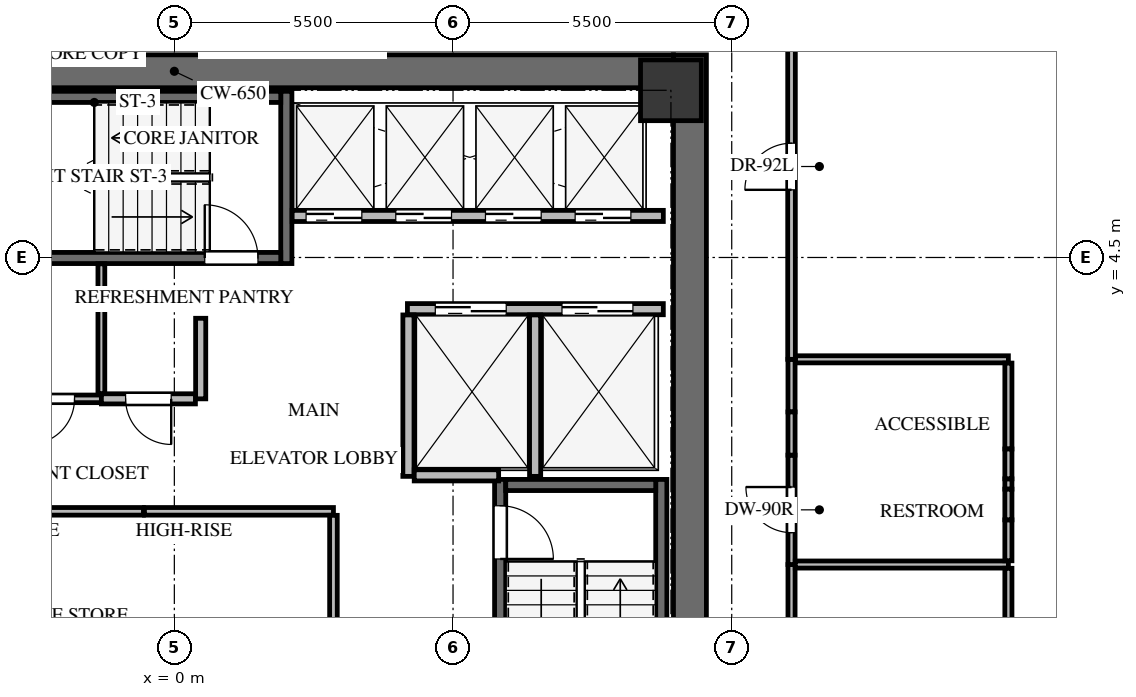
"""IFC4 building model, lengths in metres.
Left out: names, types, materials, properties, quantities, classifications, styles, units other than length and angle.
Written with IfcOpenShell. Run it as: python <this file> out.ifc"""

import sys

from ifc_helpers import new_model, si_unit, direction, frame, frame_2d, origin, origin_2d, place, context, subcontext, project, spatial, rectangle, extrude, source, transform, mapped, element, fill, save


model = new_model("IFC4")
c1 = context("Model", 3, precision=1e-05, world=origin(), true_north=direction((0.0, 1.0)))
c2 = subcontext(c1, "Body", "Model", "MODEL_VIEW")
j1 = project(units=[si_unit("LENGTHUNIT", "METRE"), si_unit("PLANEANGLEUNIT", "RADIAN")], contexts=[c1])
p1 = place(None, origin())
s1 = spatial("IfcSite", under=j1, at=p1, CompositionType="ELEMENT")
p2 = place(p1, origin())
s2 = spatial("IfcBuilding", under=s1, at=p2, CompositionType="ELEMENT")
p3 = place(p2, frame((0.0, 0.0, 203.2)))
s3 = spatial("IfcBuildingStorey", under=s2, at=p3, CompositionType="ELEMENT", Elevation=203.2)
p4 = place(p3, frame((10.175, -8.5, 0.0), z_axis=(0.0, 0.0, 1.0), x_axis=(0.0, 1.0, 0.0)))
e1 = element("IfcWall", 1, at=p4, inside=s3, PredefinedType="SHEAR", context=c2, shape_type="SweptSolid", body=[
    extrude(rectangle(XDim=17.0, YDim=0.65, at=frame_2d((8.5, 0.0))), origin(), (0.0, 0.0, 1.0), 3.0),
])
p5 = place(p3, frame((-9.85, 8.175, 0.0), z_axis=(0.0, 0.0, 1.0), x_axis=(1.0, 0.0, 0.0)))
e2 = element("IfcWall", 2, at=p5, inside=s3, PredefinedType="SHEAR", context=c2, shape_type="SweptSolid", body=[
    extrude(rectangle(XDim=19.7, YDim=0.65, at=frame_2d((9.85, 0.0))), origin(), (0.0, 0.0, 1.0), 3.0),
])
p6 = place(p3, frame((9.61, -7.77, -0.24), z_axis=(0.0, 0.0, 1.0), x_axis=(0.0, 1.0, 0.0)))
e3 = element("IfcWall", 3, at=p6, inside=s3, PredefinedType="SHEAR", context=c2, shape_type="SweptSolid", body=[
    extrude(rectangle(XDim=7.89, YDim=0.22, at=frame_2d((3.945, 0.0))), origin(), (0.0, 0.0, 1.0), 3.0),
])
p7 = place(p3, frame((6.43, 0.12, -0.24), z_axis=(0.0, 0.0, 1.0), x_axis=(0.0, -1.0, 0.0)))
e4 = element("IfcWall", 4, at=p7, inside=s3, PredefinedType="SHEAR", context=c2, shape_type="SweptSolid", body=[
    extrude(rectangle(XDim=7.89, YDim=0.22, at=frame_2d((3.945, 0.0))), origin(), (0.0, 0.0, 1.0), 3.0),
])
p8 = place(p7, frame((0.52, 0.0, 0.0)))
e5 = element("IfcOpeningElement", 5, at=p8, cuts=e4, PredefinedType="OPENING", context=c2, shape_type="SweptSolid", body=[
    extrude(rectangle(XDim=1.05, YDim=2.15, at=frame_2d((0.525, 1.075))), frame((0.0, 0.12, 0.0), z_axis=(0.0, -1.0, 0.0), x_axis=(1.0, 0.0, 0.0)), (0.0, 0.0, 1.0), 0.24),
])
p9 = place(p3, frame((9.5, 0.01, -0.24), z_axis=(0.0, 0.0, 1.0), x_axis=(-1.0, 0.0, 0.0)))
e6 = element("IfcWall", 6, at=p9, inside=s3, PredefinedType="SHEAR", context=c2, shape_type="SweptSolid", body=[
    extrude(rectangle(XDim=2.96, YDim=0.22, at=frame_2d((1.48, 0.0))), origin(), (0.0, 0.0, 1.0), 3.0),
])
p10 = place(p3, frame((2.21, 4.38, -0.24), z_axis=(0.0, 0.0, 1.0), x_axis=(0.0, 1.0, 0.0)))
e7 = element("IfcWall", 7, at=p10, inside=s3, PredefinedType="SHEAR", context=c2, shape_type="SweptSolid", body=[
    extrude(rectangle(XDim=3.4, YDim=0.22, at=frame_2d((1.7, 0.0))), origin(), (0.0, 0.0, 1.0), 3.0),
])
p11 = place(p3, frame((-5.25, 4.49, -0.24), z_axis=(0.0, 0.0, 1.0), x_axis=(1.0, 0.0, 0.0)))
e8 = element("IfcWall", 8, at=p11, inside=s3, PredefinedType="SHEAR", context=c2, shape_type="SweptSolid", body=[
    extrude(rectangle(XDim=7.35, YDim=0.22, at=frame_2d((3.675, 0.0))), origin(), (0.0, 0.0, 1.0), 3.0),
])
p12 = place(p11, frame((5.85, 0.0, 0.0)))
e9 = element("IfcOpeningElement", 9, at=p12, cuts=e8, PredefinedType="OPENING", context=c2, shape_type="SweptSolid", body=[
    extrude(rectangle(XDim=1.05, YDim=2.15, at=frame_2d((0.525, 1.075))), frame((0.0, 0.12, 0.0), z_axis=(0.0, -1.0, 0.0), x_axis=(1.0, 0.0, 0.0)), (0.0, 0.0, 1.0), 0.24),
])
p13 = place(p3, frame((2.1, 7.67, -0.24), z_axis=(0.0, 0.0, 1.0), x_axis=(-1.0, 0.0, 0.0)))
e10 = element("IfcWall", 10, at=p13, inside=s3, PredefinedType="SHEAR", context=c2, shape_type="SweptSolid", body=[
    extrude(rectangle(XDim=7.35, YDim=0.22, at=frame_2d((3.675, 0.0))), origin(), (0.0, 0.0, 1.0), 3.0),
])
m1 = source(origin(), c2, "Body", "SweptSolid", [
    extrude(rectangle(XDim=1.2, YDim=1.2, at=origin_2d()), origin(), (0.0, 0.0, 1.0), 3.0),
])
p14 = place(p3, frame((9.8, 7.8, -0.24), z_axis=(0.0, 0.0, 1.0), x_axis=(1.0, 0.0, 0.0)))
e11 = element("IfcColumn", 11, at=p14, inside=s3, PredefinedType="COLUMN", context=c2, shape_type="MappedRepresentation", body=[
    mapped(m1, transform((0.0, 0.0, 0.0), x_axis=(1.0, 0.0, 0.0), y_axis=(0.0, 1.0, 0.0), z_axis=(0.0, 0.0, 1.0), scale=1.0)),
])
p15 = place(p3, frame((4.6, 3.48, 0.0), z_axis=(0.0, 0.0, 1.0), x_axis=(1.0, 0.0, 0.0)))
e12 = element("IfcWall", 12, at=p15, inside=s3, PredefinedType="SOLIDWALL", context=c2, shape_type="SweptSolid", body=[
    extrude(rectangle(XDim=5.05, YDim=0.22, at=frame_2d((2.525, 0.0))), origin(), (0.0, 0.0, 1.0), 2.745),
])
p16 = place(p15, frame((0.55, 0.0, 0.0)))
e13 = element("IfcOpeningElement", 13, at=p16, cuts=e12, PredefinedType="OPENING", context=c2, shape_type="SweptSolid", body=[
    extrude(rectangle(XDim=1.4, YDim=2.15, at=frame_2d((0.7, 1.075))), frame((0.0, 0.12, 0.0), z_axis=(0.0, -1.0, 0.0), x_axis=(1.0, 0.0, 0.0)), (0.0, 0.0, 1.0), 0.24),
])
p17 = place(p15, frame((3.05, 0.0, 0.0)))
e14 = element("IfcOpeningElement", 14, at=p17, cuts=e12, PredefinedType="OPENING", context=c2, shape_type="SweptSolid", body=[
    extrude(rectangle(XDim=1.4, YDim=2.15, at=frame_2d((0.7, 1.075))), frame((0.0, 0.12, 0.0), z_axis=(0.0, -1.0, 0.0), x_axis=(1.0, 0.0, 0.0)), (0.0, 0.0, 1.0), 0.24),
])
for number, where, z_axis, x_axis in (
    (15, (4.62, 0.18, 0.0), (0.0, 0.0, 1.0), (0.0, 1.0, 0.0)),
    (16, (7.12, 0.18, 0.0), (0.0, 0.0, 1.0), (0.0, 1.0, 0.0)),
):
    element("IfcWall", number, at=place(p3, frame(where, z_axis=z_axis, x_axis=x_axis)), inside=s3, PredefinedType="SOLIDWALL", context=c2, shape_type="SweptSolid", body=[
        extrude(rectangle(XDim=3.186, YDim=0.22, at=frame_2d((1.593, 0.0))), origin(), (0.0, 0.0, 1.0), 2.745),
    ])
p18 = place(p3, frame((4.734, 0.2, 0.0), z_axis=(0.0, 0.0, 1.0), x_axis=(1.0, 0.0, 0.0)))
e17 = element("IfcWall", 17, at=p18, inside=s3, PredefinedType="SOLIDWALL", context=c2, shape_type="SweptSolid", body=[
    extrude(rectangle(XDim=1.666, YDim=0.22, at=frame_2d((0.833, 0.0))), origin(), (0.0, 0.0, 1.0), 2.745),
])
p19 = place(p3, frame((2.325, 5.32, 0.0), z_axis=(0.0, 0.0, 1.0), x_axis=(1.0, 0.0, 0.0)))
e18 = element("IfcWall", 18, at=p19, inside=s3, PredefinedType="SOLIDWALL", context=c2, shape_type="SweptSolid", body=[
    extrude(rectangle(XDim=7.325, YDim=0.22, at=frame_2d((3.663, 0.0))), origin(), (0.0, 0.0, 1.0), 2.745),
])
p20 = place(p19, frame((0.275, 0.0, 0.0)))
e19 = element("IfcOpeningElement", 19, at=p20, cuts=e18, PredefinedType="OPENING", context=c2, shape_type="SweptSolid", body=[
    extrude(rectangle(XDim=1.1, YDim=2.15, at=frame_2d((0.55, 1.075))), frame((0.0, 0.12, 0.0), z_axis=(0.0, -1.0, 0.0), x_axis=(1.0, 0.0, 0.0)), (0.0, 0.0, 1.0), 0.24),
])
p21 = place(p19, frame((2.045, 0.0, 0.0)))
e20 = element("IfcOpeningElement", 20, at=p21, cuts=e18, PredefinedType="OPENING", context=c2, shape_type="SweptSolid", body=[
    extrude(rectangle(XDim=1.1, YDim=2.15, at=frame_2d((0.55, 1.075))), frame((0.0, 0.12, 0.0), z_axis=(0.0, -1.0, 0.0), x_axis=(1.0, 0.0, 0.0)), (0.0, 0.0, 1.0), 0.24),
])
p22 = place(p19, frame((3.815, 0.0, 0.0)))
e21 = element("IfcOpeningElement", 21, at=p22, cuts=e18, PredefinedType="OPENING", context=c2, shape_type="SweptSolid", body=[
    extrude(rectangle(XDim=1.1, YDim=2.15, at=frame_2d((0.55, 1.075))), frame((0.0, 0.12, 0.0), z_axis=(0.0, -1.0, 0.0), x_axis=(1.0, 0.0, 0.0)), (0.0, 0.0, 1.0), 0.24),
])
p23 = place(p19, frame((5.585, 0.0, 0.0)))
e22 = element("IfcOpeningElement", 22, at=p23, cuts=e18, PredefinedType="OPENING", context=c2, shape_type="SweptSolid", body=[
    extrude(rectangle(XDim=1.1, YDim=2.15, at=frame_2d((0.55, 1.075))), frame((0.0, 0.12, 0.0), z_axis=(0.0, -1.0, 0.0), x_axis=(1.0, 0.0, 0.0)), (0.0, 0.0, 1.0), 0.24),
])
for number, where, z_axis, x_axis in (
    (23, (-4.34, -0.51, 0.0), (0.0, 0.0, 1.0), (1.0, 0.0, 0.0)),
    (24, (-0.59, -0.51, 0.0), (0.0, 0.0, 1.0), (1.0, 0.0, 0.0)),
):
    element("IfcWall", number, at=place(p3, frame(where, z_axis=z_axis, x_axis=x_axis)), inside=s3, PredefinedType="PARTITIONING", context=c2, shape_type="SweptSolid", body=[
        extrude(rectangle(XDim=3.73, YDim=0.15, at=frame_2d((1.865, 0.0))), origin(), (0.0, 0.0, 1.0), 2.745),
    ])
p24 = place(p3, frame((3.14, -0.589, 0.0), z_axis=(0.0, 0.0, 1.0), x_axis=(0.0, -1.0, 0.0)))
e25 = element("IfcWall", 25, at=p24, inside=s3, PredefinedType="PARTITIONING", context=c2, shape_type="SweptSolid", body=[
    extrude(rectangle(XDim=2.372, YDim=0.15, at=frame_2d((1.186, 0.0))), origin(), (0.0, 0.0, 1.0), 2.745),
])
p25 = place(p3, frame((-1.44, 1.71, 0.0), z_axis=(0.0, 0.0, 1.0), x_axis=(-1.0, 0.0, 0.0)))
e26 = element("IfcWall", 26, at=p25, inside=s3, PredefinedType="PARTITIONING", context=c2, shape_type="SweptSolid", body=[
    extrude(rectangle(XDim=1.96, YDim=0.15, at=frame_2d((0.98, 0.0))), origin(), (0.0, 0.0, 1.0), 2.745),
])
p26 = place(p25, frame((0.53, 0.0, 0.0)))
e27 = element("IfcOpeningElement", 27, at=p26, cuts=e26, PredefinedType="OPENING", context=c2, shape_type="SweptSolid", body=[
    extrude(rectangle(XDim=0.9, YDim=2.05, at=frame_2d((0.45, 1.025))), frame((0.0, 0.085, 0.0), z_axis=(0.0, -1.0, 0.0), x_axis=(1.0, 0.0, 0.0)), (0.0, 0.0, 1.0), 0.17),
])
p27 = place(p3, frame((0.52, 3.3, 0.0), z_axis=(0.0, 0.0, 1.0), x_axis=(0.0, -1.0, 0.0)))
e28 = element("IfcWall", 28, at=p27, inside=s3, PredefinedType="SOLIDWALL", context=c2, shape_type="SweptSolid", body=[
    extrude(rectangle(XDim=1.59, YDim=0.2, at=frame_2d((0.795, 0.0))), origin(), (0.0, 0.0, 1.0), 2.745),
])
p28 = place(p3, frame((0.416, 1.71, 0.0), z_axis=(0.0, 0.0, 1.0), x_axis=(-1.0, 0.0, 0.0)))
e29 = element("IfcWall", 29, at=p28, inside=s3, PredefinedType="SOLIDWALL", context=c2, shape_type="SweptSolid", body=[
    extrude(rectangle(XDim=1.856, YDim=0.2, at=frame_2d((0.928, 0.0))), origin(), (0.0, 0.0, 1.0), 2.745),
])
p29 = place(p28, frame((0.478, 0.0, 0.0)))
e30 = element("IfcOpeningElement", 30, at=p29, cuts=e29, PredefinedType="OPENING", context=c2, shape_type="SweptSolid", body=[
    extrude(rectangle(XDim=0.9, YDim=2.05, at=frame_2d((0.45, 1.025))), frame((0.0, 0.11, 0.0), z_axis=(0.0, -1.0, 0.0), x_axis=(1.0, 0.0, 0.0)), (0.0, 0.0, 1.0), 0.22),
])
p30 = place(p3, frame((12.18, -4.96, 0.0), z_axis=(0.0, 0.0, 1.0), x_axis=(0.0, 1.0, 0.0)))
e31 = element("IfcWall", 31, at=p30, inside=s3, PredefinedType="PARTITIONING", context=c2, shape_type="SweptSolid", body=[
    extrude(rectangle(XDim=3.4, YDim=0.14, at=frame_2d((1.7, 0.0))), origin(), (0.0, 0.0, 1.0), 2.745),
])
p31 = place(p30, frame((1.25, 0.0, 0.0)))
e32 = element("IfcOpeningElement", 32, at=p31, cuts=e31, PredefinedType="OPENING", context=c2, shape_type="SweptSolid", body=[
    extrude(rectangle(XDim=0.9, YDim=2.05, at=frame_2d((0.45, 1.025))), frame((0.0, 0.08, 0.0), z_axis=(0.0, -1.0, 0.0), x_axis=(1.0, 0.0, 0.0)), (0.0, 0.0, 1.0), 0.16),
])
p32 = place(p3, frame((12.18, -1.56, 0.0), z_axis=(0.0, 0.0, 1.0), x_axis=(0.0, 1.0, 0.0)))
e33 = element("IfcWall", 33, at=p32, inside=s3, PredefinedType="PARTITIONING", context=c2, shape_type="SweptSolid", body=[
    extrude(rectangle(XDim=2.159, YDim=0.14, at=frame_2d((1.08, 0.0))), origin(), (0.0, 0.0, 1.0), 2.745),
])
p33 = place(p32, frame((0.629, 0.0, 0.0)))
e34 = element("IfcOpeningElement", 34, at=p33, cuts=e33, PredefinedType="OPENING", context=c2, shape_type="SweptSolid", body=[
    extrude(rectangle(XDim=0.9, YDim=2.05, at=frame_2d((0.45, 1.025))), frame((0.0, 0.08, 0.0), z_axis=(0.0, -1.0, 0.0), x_axis=(1.0, 0.0, 0.0)), (0.0, 0.0, 1.0), 0.16),
])
p34 = place(p3, frame((12.18, 1.452, 0.0), z_axis=(0.0, 0.0, 1.0), x_axis=(0.0, 1.0, 0.0)))
e35 = element("IfcWall", 35, at=p34, inside=s3, PredefinedType="PARTITIONING", context=c2, shape_type="SweptSolid", body=[
    extrude(rectangle(XDim=1.038, YDim=0.14, at=frame_2d((0.519, 0.0))), origin(), (0.0, 0.0, 1.0), 2.745),
])
p35 = place(p3, frame((12.18, 0.599, 0.0), z_axis=(0.0, 0.0, 1.0), x_axis=(0.0, 1.0, 0.0)))
e36 = element("IfcWall", 36, at=p35, inside=s3, PredefinedType="PARTITIONING", context=c2, shape_type="SweptSolid", body=[
    extrude(rectangle(XDim=0.853, YDim=0.14, at=frame_2d((0.427, 0.0))), origin(), (0.0, 0.0, 1.0), 1.942),
])
p36 = place(p3, frame((12.18, 2.49, 0.0), z_axis=(0.0, 0.0, 1.0), x_axis=(0.0, 1.0, 0.0)))
e37 = element("IfcWall", 37, at=p36, inside=s3, PredefinedType="PARTITIONING", context=c2, shape_type="SweptSolid", body=[
    extrude(rectangle(XDim=7.611, YDim=0.15, at=frame_2d((3.806, 0.0))), origin(), (0.0, 0.0, 1.0), 2.745),
])
p37 = place(p36, frame((3.345, 0.0, 0.0)))
e38 = element("IfcOpeningElement", 38, at=p37, cuts=e37, PredefinedType="OPENING", context=c2, shape_type="SweptSolid", body=[
    extrude(rectangle(XDim=0.92, YDim=2.1, at=frame_2d((0.46, 1.05))), frame((0.0, 0.085, 0.0), z_axis=(0.0, -1.0, 0.0), x_axis=(1.0, 0.0, 0.0)), (0.0, 0.0, 1.0), 0.17),
])
p38 = place(p3, frame((-1.44, 4.375, 0.0), z_axis=(0.0, 0.0, 1.0), x_axis=(0.0, -1.0, 0.0)))
e39 = element("IfcWall", 39, at=p38, inside=s3, PredefinedType="PARTITIONING", context=c2, shape_type="SweptSolid", body=[
    extrude(rectangle(XDim=2.561, YDim=0.135, at=frame_2d((1.281, 0.0))), origin(), (0.0, 0.0, 1.0), 2.745),
])
p39 = place(p3, frame((12.254, -1.56, 0.0), z_axis=(0.0, 0.0, 1.0), x_axis=(1.0, 0.0, 0.0)))
e40 = element("IfcWall", 40, at=p39, inside=s3, PredefinedType="PARTITIONING", context=c2, shape_type="SweptSolid", body=[
    extrude(rectangle(XDim=4.206, YDim=0.14, at=frame_2d((2.103, 0.0))), origin(), (0.0, 0.0, 1.0), 2.745),
])
p40 = place(p3, frame((16.46, -1.634, 0.0), z_axis=(0.0, 0.0, 1.0), x_axis=(0.0, -1.0, 0.0)))
e41 = element("IfcWall", 41, at=p40, inside=s3, PredefinedType="PARTITIONING", context=c2, shape_type="SweptSolid", body=[
    extrude(rectangle(XDim=3.252, YDim=0.14, at=frame_2d((1.626, 0.0))), origin(), (0.0, 0.0, 1.0), 2.745),
])
p41 = place(p3, frame((12.259, 2.49, 0.0), z_axis=(0.0, 0.0, 1.0), x_axis=(1.0, 0.0, 0.0)))
e42 = element("IfcWall", 42, at=p41, inside=s3, PredefinedType="PARTITIONING", context=c2, shape_type="SweptSolid", body=[
    extrude(rectangle(XDim=4.201, YDim=0.14, at=frame_2d((2.101, 0.0))), origin(), (0.0, 0.0, 1.0), 2.745),
])
p42 = place(p3, frame((16.46, 2.416, 0.0), z_axis=(0.0, 0.0, 1.0), x_axis=(0.0, -1.0, 0.0)))
e43 = element("IfcWall", 43, at=p42, inside=s3, PredefinedType="PARTITIONING", context=c2, shape_type="SweptSolid", body=[
    extrude(rectangle(XDim=1.696, YDim=0.14, at=frame_2d((0.848, 0.0))), origin(), (0.0, 0.0, 1.0), 2.745),
])
p43 = place(p3, frame((16.46, 0.131, 0.0), z_axis=(0.0, 0.0, 1.0), x_axis=(0.0, -1.0, 0.0)))
e44 = element("IfcWall", 44, at=p43, inside=s3, PredefinedType="PARTITIONING", context=c2, shape_type="SweptSolid", body=[
    extrude(rectangle(XDim=0.203, YDim=0.14, at=frame_2d((0.102, 0.0))), origin(), (0.0, 0.0, 1.0), 2.745),
])
p44 = place(p3, frame((16.46, -0.678, 0.0), z_axis=(0.0, 0.0, 1.0), x_axis=(0.0, -1.0, 0.0)))
e45 = element("IfcWall", 45, at=p44, inside=s3, PredefinedType="PARTITIONING", context=c2, shape_type="SweptSolid", body=[
    extrude(rectangle(XDim=0.808, YDim=0.14, at=frame_2d((0.404, 0.0))), origin(), (0.0, 0.0, 1.0), 2.745),
])
p45 = place(p3, frame((16.46, 0.72, 0.0), z_axis=(0.0, 0.0, 1.0), x_axis=(0.0, -1.0, 0.0)))
e46 = element("IfcWall", 46, at=p45, inside=s3, PredefinedType="PARTITIONING", context=c2, shape_type="SweptSolid", body=[
    extrude(rectangle(XDim=0.589, YDim=0.14, at=frame_2d((0.294, 0.0))), origin(), (0.0, 0.0, 1.0), 1.942),
])
p46 = place(p3, frame((16.46, -0.072, 0.0), z_axis=(0.0, 0.0, 1.0), x_axis=(0.0, -1.0, 0.0)))
e47 = element("IfcWall", 47, at=p46, inside=s3, PredefinedType="PARTITIONING", context=c2, shape_type="SweptSolid", body=[
    extrude(rectangle(XDim=0.606, YDim=0.14, at=frame_2d((0.303, 0.0))), origin(), (0.0, 0.0, 1.0), 1.942),
])
m2 = source(origin(), c2, "Body", "SweptSolid", [
    extrude(rectangle(XDim=1.05, YDim=2.15, at=frame_2d((0.525, 1.075))), frame((0.0, 0.025, 0.0), z_axis=(0.0, -1.0, 0.0), x_axis=(1.0, 0.0, 0.0)), (0.0, 0.0, 1.0), 0.05),
])
p47 = place(p8, origin())
e48 = element("IfcDoor", 48, at=p47, inside=s3, OperationType="SINGLE_SWING_RIGHT", PredefinedType="DOOR", context=c2, shape_type="MappedRepresentation", body=[
    mapped(m2, transform((0.0, 0.0, 0.0), x_axis=(1.0, 0.0, 0.0), y_axis=(0.0, 1.0, 0.0), z_axis=(0.0, 0.0, 1.0), scale=1.0)),
])
fill(e5, e48)
m3 = source(origin(), c2, "Body", "SweptSolid", [
    extrude(rectangle(XDim=1.05, YDim=2.15, at=frame_2d((0.525, 1.075))), frame((0.0, 0.025, 0.0), z_axis=(0.0, -1.0, 0.0), x_axis=(1.0, 0.0, 0.0)), (0.0, 0.0, 1.0), 0.05),
])
p48 = place(p12, origin())
e49 = element("IfcDoor", 49, at=p48, inside=s3, OperationType="SINGLE_SWING_LEFT", PredefinedType="DOOR", context=c2, shape_type="MappedRepresentation", body=[
    mapped(m3, transform((0.0, 0.0, 0.0), x_axis=(1.0, 0.0, 0.0), y_axis=(0.0, 1.0, 0.0), z_axis=(0.0, 0.0, 1.0), scale=1.0)),
])
fill(e9, e49)
m4 = source(origin(), c2, "Body", "SweptSolid", [
    extrude(rectangle(XDim=1.4, YDim=2.15, at=frame_2d((0.7, 1.075))), frame((0.0, 0.025, 0.0), z_axis=(0.0, -1.0, 0.0), x_axis=(1.0, 0.0, 0.0)), (0.0, 0.0, 1.0), 0.05),
])
p49 = place(p16, origin())
e50 = element("IfcDoor", 50, at=p49, inside=s3, OperationType="DOUBLE_DOOR_SLIDING", PredefinedType="DOOR", context=c2, shape_type="MappedRepresentation", body=[
    mapped(m4, transform((0.0, 0.0, 0.0), x_axis=(1.0, 0.0, 0.0), y_axis=(0.0, 1.0, 0.0), z_axis=(0.0, 0.0, 1.0), scale=1.0)),
])
fill(e13, e50)
p50 = place(p17, origin())
e51 = element("IfcDoor", 51, at=p50, inside=s3, OperationType="DOUBLE_DOOR_SLIDING", PredefinedType="DOOR", context=c2, shape_type="MappedRepresentation", body=[
    mapped(m4, transform((0.0, 0.0, 0.0), x_axis=(1.0, 0.0, 0.0), y_axis=(0.0, 1.0, 0.0), z_axis=(0.0, 0.0, 1.0), scale=1.0)),
])
fill(e14, e51)
m5 = source(origin(), c2, "Body", "SweptSolid", [
    extrude(rectangle(XDim=1.1, YDim=2.15, at=frame_2d((0.55, 1.075))), frame((0.0, 0.025, 0.0), z_axis=(0.0, -1.0, 0.0), x_axis=(1.0, 0.0, 0.0)), (0.0, 0.0, 1.0), 0.05),
])
p51 = place(p20, origin())
e52 = element("IfcDoor", 52, at=p51, inside=s3, OperationType="DOUBLE_DOOR_SLIDING", PredefinedType="DOOR", context=c2, shape_type="MappedRepresentation", body=[
    mapped(m5, transform((0.0, 0.0, 0.0), x_axis=(1.0, 0.0, 0.0), y_axis=(0.0, 1.0, 0.0), z_axis=(0.0, 0.0, 1.0), scale=1.0)),
])
fill(e19, e52)
p52 = place(p21, origin())
e53 = element("IfcDoor", 53, at=p52, inside=s3, OperationType="DOUBLE_DOOR_SLIDING", PredefinedType="DOOR", context=c2, shape_type="MappedRepresentation", body=[
    mapped(m5, transform((0.0, 0.0, 0.0), x_axis=(1.0, 0.0, 0.0), y_axis=(0.0, 1.0, 0.0), z_axis=(0.0, 0.0, 1.0), scale=1.0)),
])
fill(e20, e53)
p53 = place(p22, origin())
e54 = element("IfcDoor", 54, at=p53, inside=s3, OperationType="DOUBLE_DOOR_SLIDING", PredefinedType="DOOR", context=c2, shape_type="MappedRepresentation", body=[
    mapped(m5, transform((0.0, 0.0, 0.0), x_axis=(1.0, 0.0, 0.0), y_axis=(0.0, 1.0, 0.0), z_axis=(0.0, 0.0, 1.0), scale=1.0)),
])
fill(e21, e54)
p54 = place(p23, origin())
e55 = element("IfcDoor", 55, at=p54, inside=s3, OperationType="DOUBLE_DOOR_SLIDING", PredefinedType="DOOR", context=c2, shape_type="MappedRepresentation", body=[
    mapped(m5, transform((0.0, 0.0, 0.0), x_axis=(1.0, 0.0, 0.0), y_axis=(0.0, 1.0, 0.0), z_axis=(0.0, 0.0, 1.0), scale=1.0)),
])
fill(e22, e55)
m6 = source(origin(), c2, "Body", "SweptSolid", [
    extrude(rectangle(XDim=0.9, YDim=2.05, at=frame_2d((0.45, 1.025))), frame((0.0, 0.025, 0.0), z_axis=(0.0, -1.0, 0.0), x_axis=(1.0, 0.0, 0.0)), (0.0, 0.0, 1.0), 0.05),
])
p55 = place(p26, origin())
e56 = element("IfcDoor", 56, at=p55, inside=s3, OperationType="SINGLE_SWING_RIGHT", PredefinedType="DOOR", context=c2, shape_type="MappedRepresentation", body=[
    mapped(m6, transform((0.0, 0.0, 0.0), x_axis=(1.0, 0.0, 0.0), y_axis=(0.0, 1.0, 0.0), z_axis=(0.0, 0.0, 1.0), scale=1.0)),
])
fill(e27, e56)
m7 = source(origin(), c2, "Body", "SweptSolid", [
    extrude(rectangle(XDim=0.9, YDim=2.05, at=frame_2d((0.45, 1.025))), frame((0.0, 0.025, 0.0), z_axis=(0.0, -1.0, 0.0), x_axis=(1.0, 0.0, 0.0)), (0.0, 0.0, 1.0), 0.05),
])
p56 = place(p29, origin())
e57 = element("IfcDoor", 57, at=p56, inside=s3, OperationType="SINGLE_SWING_LEFT", PredefinedType="DOOR", context=c2, shape_type="MappedRepresentation", body=[
    mapped(m7, transform((0.0, 0.0, 0.0), x_axis=(1.0, 0.0, 0.0), y_axis=(0.0, 1.0, 0.0), z_axis=(0.0, 0.0, 1.0), scale=1.0)),
])
fill(e30, e57)
m8 = source(origin(), c2, "Body", "SweptSolid", [
    extrude(rectangle(XDim=0.9, YDim=2.05, at=frame_2d((0.45, 1.025))), frame((0.0, 0.025, 0.0), z_axis=(0.0, -1.0, 0.0), x_axis=(1.0, 0.0, 0.0)), (0.0, 0.0, 1.0), 0.05),
])
p57 = place(p33, origin())
e58 = element("IfcDoor", 58, at=p57, inside=s3, OperationType="SINGLE_SWING_RIGHT", PredefinedType="DOOR", context=c2, shape_type="MappedRepresentation", body=[
    mapped(m8, transform((0.0, 0.0, 0.0), x_axis=(1.0, 0.0, 0.0), y_axis=(0.0, 1.0, 0.0), z_axis=(0.0, 0.0, 1.0), scale=1.0)),
])
fill(e34, e58)
m9 = source(origin(), c2, "Body", "SweptSolid", [
    extrude(rectangle(XDim=0.92, YDim=2.1, at=frame_2d((0.46, 1.05))), frame((0.0, 0.025, 0.0), z_axis=(0.0, -1.0, 0.0), x_axis=(1.0, 0.0, 0.0)), (0.0, 0.0, 1.0), 0.05),
])
p58 = place(p37, origin())
e59 = element("IfcDoor", 59, at=p58, inside=s3, OperationType="SINGLE_SWING_LEFT", PredefinedType="DOOR", context=c2, shape_type="MappedRepresentation", body=[
    mapped(m9, transform((0.0, 0.0, 0.0), x_axis=(1.0, 0.0, 0.0), y_axis=(0.0, 1.0, 0.0), z_axis=(0.0, 0.0, 1.0), scale=1.0)),
])
fill(e38, e59)
save(model, sys.argv[1])
